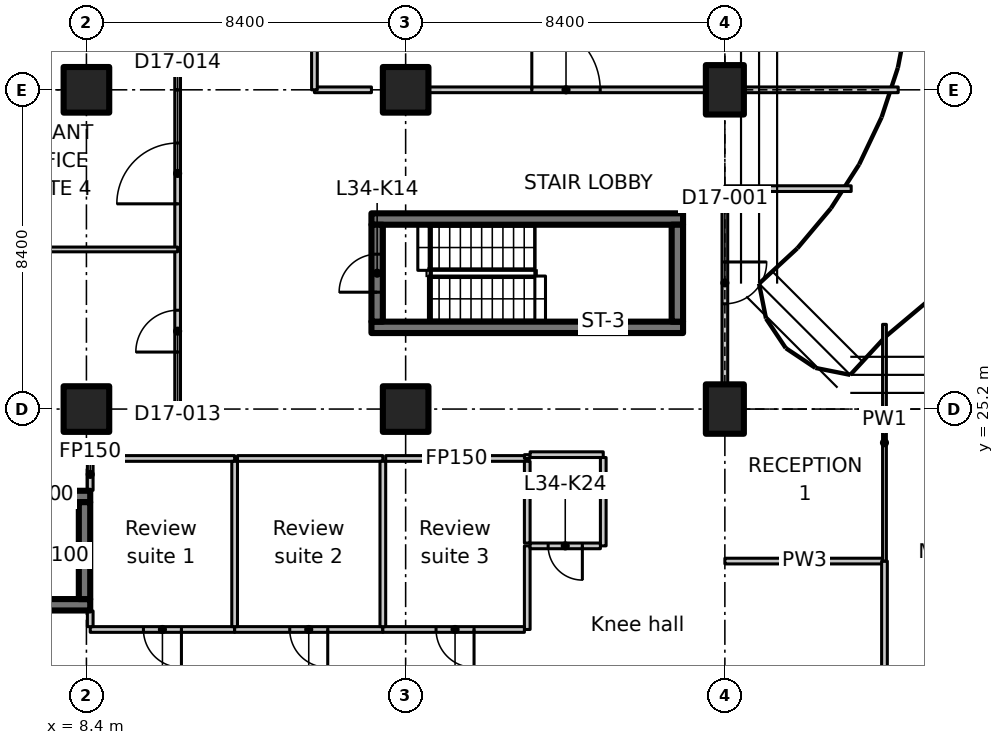
"""IFC4 building model, lengths in metres.
Left out: names, types, materials, properties, quantities, classifications, styles, units other than length and angle.
Written with IfcOpenShell. Run it as: python <this file> out.ifc"""

import sys

from ifc_helpers import new_model, si_unit, direction, frame, frame_2d, origin, origin_2d, place, context, subcontext, project, spatial, polyline, rectangle, outline, extrude, element, fill, save


model = new_model("IFC4")
c1 = context("Model", 3, precision=1e-05, world=origin(), true_north=direction((0.0, 1.0)))
c2 = subcontext(c1, "Body", "Model", "MODEL_VIEW")
j1 = project(units=[si_unit("LENGTHUNIT", "METRE"), si_unit("PLANEANGLEUNIT", "RADIAN")], contexts=[c1])
p1 = place(None, origin())
s1 = spatial("IfcSite", under=j1, at=p1, CompositionType="ELEMENT")
p2 = place(p1, origin())
s2 = spatial("IfcBuilding", under=s1, at=p2, CompositionType="ELEMENT")
p3 = place(p2, frame((0.0, 0.0, 138.5)))
s3 = spatial("IfcBuildingStorey", under=s2, at=p3, CompositionType="ELEMENT", Elevation=138.5)
for number, where, z_axis, x_axis in (
    (1, (8.4, 25.2, 0.0), (0.0, 0.0, 1.0), (1.0, 0.0, 0.0)),
    (2, (8.4, 33.6, 0.0), (0.0, 0.0, 1.0), (1.0, 0.0, 0.0)),
    (3, (16.8, 25.2, 0.0), (0.0, 0.0, 1.0), (1.0, 0.0, 0.0)),
    (4, (16.8, 33.6, 0.0), (0.0, 0.0, 1.0), (1.0, 0.0, 0.0)),
):
    element("IfcColumn", number, at=place(p3, frame(where, z_axis=z_axis, x_axis=x_axis)), inside=s3, PredefinedType="COLUMN", context=c2, shape_type="SweptSolid", body=[
        extrude(rectangle(XDim=1.2, YDim=1.2, at=origin_2d()), origin(), (0.0, 0.0, 1.0), 3.35),
    ])
for number, where, z_axis, x_axis in (
    (5, (25.2, 25.2, 0.0), (0.0, 0.0, 1.0), (1.0, 0.0, 0.0)),
    (6, (25.2, 33.6, 0.0), (0.0, 0.0, 1.0), (1.0, 0.0, 0.0)),
):
    element("IfcColumn", number, at=place(p3, frame(where, z_axis=z_axis, x_axis=x_axis)), inside=s3, PredefinedType="COLUMN", context=c2, shape_type="SweptSolid", body=[
        extrude(rectangle(XDim=1.0, YDim=1.3, at=origin_2d()), origin(), (0.0, 0.0, 1.0), 3.35),
    ])
p4 = place(p3, frame((8.5, 20.05, 0.0), z_axis=(0.0, 0.0, 1.0), x_axis=(-1.0, 0.0, 0.0)))
e7 = element("IfcWall", 7, at=p4, inside=s3, PredefinedType="SHEAR", context=c2, shape_type="SweptSolid", body=[
    extrude(rectangle(XDim=8.2, YDim=0.3, at=frame_2d((4.1, 0.0))), origin(), (0.0, 0.0, 1.0), 3.35),
])
p5 = place(p4, frame((6.8, 0.0, 0.0)))
e8 = element("IfcOpeningElement", 8, at=p5, cuts=e7, PredefinedType="OPENING", context=c2, shape_type="SweptSolid", body=[
    extrude(rectangle(XDim=1.0, YDim=2.1, at=frame_2d((0.5, 1.05))), frame((0.0, 0.16, 0.0), z_axis=(0.0, -1.0, 0.0), x_axis=(1.0, 0.0, 0.0)), (0.0, 0.0, 1.0), 0.32),
])
p6 = place(p3, frame((0.3, 22.9, 0.0), z_axis=(0.0, 0.0, 1.0), x_axis=(1.0, 0.0, 0.0)))
e9 = element("IfcWall", 9, at=p6, inside=s3, PredefinedType="SHEAR", context=c2, shape_type="SweptSolid", body=[
    extrude(rectangle(XDim=8.2, YDim=0.3, at=frame_2d((4.1, 0.0))), origin(), (0.0, 0.0, 1.0), 3.35),
])
p7 = place(p6, frame((0.4, 0.0, 0.0)))
e10 = element("IfcOpeningElement", 10, at=p7, cuts=e9, PredefinedType="OPENING", context=c2, shape_type="SweptSolid", body=[
    extrude(rectangle(XDim=1.0, YDim=2.1, at=frame_2d((0.5, 1.05))), frame((0.0, 0.16, 0.0), z_axis=(0.0, -1.0, 0.0), x_axis=(1.0, 0.0, 0.0)), (0.0, 0.0, 1.0), 0.32),
])
p8 = place(p3, frame((8.35, 20.2, 0.0), z_axis=(0.0, 0.0, 1.0), x_axis=(0.0, 1.0, 0.0)))
e11 = element("IfcWall", 11, at=p8, inside=s3, PredefinedType="SHEAR", context=c2, shape_type="SweptSolid", body=[
    extrude(rectangle(XDim=2.55, YDim=0.3, at=frame_2d((1.275, 0.0))), origin(), (0.0, 0.0, 1.0), 3.35),
])
for number, where, z_axis, x_axis in (
    (12, (15.9, 27.35, 0.0), (0.0, 0.0, 1.0), (1.0, 0.0, 0.0)),
    (13, (15.9, 30.2, 0.0), (0.0, 0.0, 1.0), (1.0, 0.0, 0.0)),
):
    element("IfcWall", number, at=place(p3, frame(where, z_axis=z_axis, x_axis=x_axis)), inside=s3, PredefinedType="SHEAR", context=c2, shape_type="SweptSolid", body=[
        extrude(rectangle(XDim=8.2, YDim=0.3, at=frame_2d((4.1, 0.0))), origin(), (0.0, 0.0, 1.0), 3.35),
    ])
p9 = place(p3, frame((16.05, 27.5, 0.0), z_axis=(0.0, 0.0, 1.0), x_axis=(0.0, 1.0, 0.0)))
e14 = element("IfcWall", 14, at=p9, inside=s3, PredefinedType="SHEAR", context=c2, shape_type="SweptSolid", body=[
    extrude(rectangle(XDim=2.55, YDim=0.3, at=frame_2d((1.275, 0.0))), origin(), (0.0, 0.0, 1.0), 3.35),
])
p10 = place(p9, frame((0.775, 0.0, 0.0)))
e15 = element("IfcOpeningElement", 15, at=p10, cuts=e14, PredefinedType="OPENING", context=c2, shape_type="SweptSolid", body=[
    extrude(rectangle(XDim=1.0, YDim=2.1, at=frame_2d((0.5, 1.05))), frame((0.0, 0.16, 0.0), z_axis=(0.0, -1.0, 0.0), x_axis=(1.0, 0.0, 0.0)), (0.0, 0.0, 1.0), 0.32),
])
p11 = place(p3, frame((23.95, 27.5, 0.0), z_axis=(0.0, 0.0, 1.0), x_axis=(0.0, 1.0, 0.0)))
e16 = element("IfcWall", 16, at=p11, inside=s3, PredefinedType="SHEAR", context=c2, shape_type="SweptSolid", body=[
    extrude(rectangle(XDim=2.55, YDim=0.3, at=frame_2d((1.275, 0.0))), origin(), (0.0, 0.0, 1.0), 3.35),
])
p12 = place(p3, frame((12.3, 19.4, 0.0), z_axis=(0.0, 0.0, 1.0), x_axis=(-1.0, 0.0, 0.0)))
e17 = element("IfcWall", 17, at=p12, inside=s3, PredefinedType="PARTITIONING", context=c2, shape_type="SweptSolid", body=[
    extrude(rectangle(XDim=3.8, YDim=0.15, at=frame_2d((1.9, 0.0))), origin(), (0.0, 0.0, 1.0), 3.35),
])
p13 = place(p12, frame((1.4, 0.0, 0.0)))
e18 = element("IfcOpeningElement", 18, at=p13, cuts=e17, PredefinedType="OPENING", context=c2, shape_type="SweptSolid", body=[
    extrude(rectangle(XDim=1.0, YDim=2.1, at=frame_2d((0.5, 1.05))), frame((0.0, 0.085, 0.0), z_axis=(0.0, -1.0, 0.0), x_axis=(1.0, 0.0, 0.0)), (0.0, 0.0, 1.0), 0.17),
])
p14 = place(p3, frame((8.5, 19.475, 0.0), z_axis=(0.0, 0.0, 1.0), x_axis=(0.0, 1.0, 0.0)))
e19 = element("IfcWall", 19, at=p14, inside=s3, PredefinedType="PARTITIONING", context=c2, shape_type="SweptSolid", body=[
    extrude(rectangle(XDim=0.413, YDim=0.15, at=frame_2d((0.207, 0.0))), origin(), (0.0, 0.0, 1.0), 3.35),
])
p15 = place(p3, frame((8.5, 23.062, 0.0), z_axis=(0.0, 0.0, 1.0), x_axis=(0.0, 1.0, 0.0)))
e20 = element("IfcWall", 20, at=p15, inside=s3, PredefinedType="PARTITIONING", context=c2, shape_type="SweptSolid", body=[
    extrude(rectangle(XDim=0.838, YDim=0.15, at=frame_2d((0.419, 0.0))), origin(), (0.0, 0.0, 1.0), 3.35),
])
p16 = place(p3, frame((8.575, 23.9, 0.0), z_axis=(0.0, 0.0, 1.0), x_axis=(1.0, 0.0, 0.0)))
e21 = element("IfcWall", 21, at=p16, inside=s3, PredefinedType="PARTITIONING", context=c2, shape_type="SweptSolid", body=[
    extrude(rectangle(XDim=3.725, YDim=0.15, at=frame_2d((1.863, 0.0))), origin(), (0.0, 0.0, 1.0), 3.35),
])
p17 = place(p3, frame((16.2, 19.4, 0.0), z_axis=(0.0, 0.0, 1.0), x_axis=(-1.0, 0.0, 0.0)))
e22 = element("IfcWall", 22, at=p17, inside=s3, PredefinedType="PARTITIONING", context=c2, shape_type="SweptSolid", body=[
    extrude(rectangle(XDim=3.9, YDim=0.15, at=frame_2d((1.95, 0.0))), origin(), (0.0, 0.0, 1.0), 3.35),
])
p18 = place(p17, frame((1.45, 0.0, 0.0)))
e23 = element("IfcOpeningElement", 23, at=p18, cuts=e22, PredefinedType="OPENING", context=c2, shape_type="SweptSolid", body=[
    extrude(rectangle(XDim=1.0, YDim=2.1, at=frame_2d((0.5, 1.05))), frame((0.0, 0.085, 0.0), z_axis=(0.0, -1.0, 0.0), x_axis=(1.0, 0.0, 0.0)), (0.0, 0.0, 1.0), 0.17),
])
p19 = place(p3, frame((12.3, 23.825, 0.0), z_axis=(0.0, 0.0, 1.0), x_axis=(0.0, -1.0, 0.0)))
e24 = element("IfcWall", 24, at=p19, inside=s3, PredefinedType="PARTITIONING", context=c2, shape_type="SweptSolid", body=[
    extrude(rectangle(XDim=4.35, YDim=0.15, at=frame_2d((2.175, 0.0))), origin(), (0.0, 0.0, 1.0), 3.35),
])
p20 = place(p3, frame((12.375, 23.9, 0.0), z_axis=(0.0, 0.0, 1.0), x_axis=(1.0, 0.0, 0.0)))
e25 = element("IfcWall", 25, at=p20, inside=s3, PredefinedType="PARTITIONING", context=c2, shape_type="SweptSolid", body=[
    extrude(rectangle(XDim=3.825, YDim=0.15, at=frame_2d((1.913, 0.0))), origin(), (0.0, 0.0, 1.0), 3.35),
])
p21 = place(p3, frame((20.0, 21.6, 0.0), z_axis=(0.0, 0.0, 1.0), x_axis=(0.0, -1.0, 0.0)))
e26 = element("IfcWall", 26, at=p21, inside=s3, PredefinedType="PARTITIONING", context=c2, shape_type="SweptSolid", body=[
    extrude(rectangle(XDim=2.2, YDim=0.15, at=frame_2d((1.1, 0.0))), origin(), (0.0, 0.0, 1.0), 3.35),
])
p22 = place(p3, frame((19.925, 19.4, 0.0), z_axis=(0.0, 0.0, 1.0), x_axis=(-1.0, 0.0, 0.0)))
e27 = element("IfcWall", 27, at=p22, inside=s3, PredefinedType="PARTITIONING", context=c2, shape_type="SweptSolid", body=[
    extrude(rectangle(XDim=3.725, YDim=0.15, at=frame_2d((1.863, 0.0))), origin(), (0.0, 0.0, 1.0), 3.35),
])
p23 = place(p22, frame((1.325, 0.0, 0.0)))
e28 = element("IfcOpeningElement", 28, at=p23, cuts=e27, PredefinedType="OPENING", context=c2, shape_type="SweptSolid", body=[
    extrude(rectangle(XDim=1.0, YDim=2.1, at=frame_2d((0.5, 1.05))), frame((0.0, 0.085, 0.0), z_axis=(0.0, -1.0, 0.0), x_axis=(1.0, 0.0, 0.0)), (0.0, 0.0, 1.0), 0.17),
])
p24 = place(p3, frame((16.2, 23.825, 0.0), z_axis=(0.0, 0.0, 1.0), x_axis=(0.0, -1.0, 0.0)))
e29 = element("IfcWall", 29, at=p24, inside=s3, PredefinedType="PARTITIONING", context=c2, shape_type="SweptSolid", body=[
    extrude(rectangle(XDim=4.35, YDim=0.15, at=frame_2d((2.175, 0.0))), origin(), (0.0, 0.0, 1.0), 3.35),
])
p25 = place(p3, frame((16.275, 23.9, 0.0), z_axis=(0.0, 0.0, 1.0), x_axis=(1.0, 0.0, 0.0)))
e30 = element("IfcWall", 30, at=p25, inside=s3, PredefinedType="PARTITIONING", context=c2, shape_type="SweptSolid", body=[
    extrude(rectangle(XDim=3.725, YDim=0.15, at=frame_2d((1.863, 0.0))), origin(), (0.0, 0.0, 1.0), 3.35),
])
p26 = place(p3, frame((20.0, 23.9, 0.0), z_axis=(0.0, 0.0, 1.0), x_axis=(0.0, 1.0, 0.0)))
e31 = element("IfcWall", 31, at=p26, inside=s3, PredefinedType="PARTITIONING", context=c2, shape_type="SweptSolid", body=[
    extrude(rectangle(XDim=0.1, YDim=0.15, at=frame_2d((0.05, 0.0))), origin(), (0.0, 0.0, 1.0), 3.35),
])
p27 = place(p3, frame((20.075, 24.0, 0.0), z_axis=(0.0, 0.0, 1.0), x_axis=(1.0, 0.0, 0.0)))
e32 = element("IfcWall", 32, at=p27, inside=s3, PredefinedType="PARTITIONING", context=c2, shape_type="SweptSolid", body=[
    extrude(rectangle(XDim=1.925, YDim=0.15, at=frame_2d((0.962, 0.0))), origin(), (0.0, 0.0, 1.0), 3.35),
])
p28 = place(p3, frame((22.0, 23.925, 0.0), z_axis=(0.0, 0.0, 1.0), x_axis=(0.0, -1.0, 0.0)))
e33 = element("IfcWall", 33, at=p28, inside=s3, PredefinedType="PARTITIONING", context=c2, shape_type="SweptSolid", body=[
    extrude(rectangle(XDim=2.325, YDim=0.15, at=frame_2d((1.163, 0.0))), origin(), (0.0, 0.0, 1.0), 3.35),
])
p29 = place(p3, frame((21.925, 21.6, 0.0), z_axis=(0.0, 0.0, 1.0), x_axis=(-1.0, 0.0, 0.0)))
e34 = element("IfcWall", 34, at=p29, inside=s3, PredefinedType="PARTITIONING", context=c2, shape_type="SweptSolid", body=[
    extrude(rectangle(XDim=1.85, YDim=0.15, at=frame_2d((0.925, 0.0))), origin(), (0.0, 0.0, 1.0), 3.35),
])
p30 = place(p29, frame((0.475, 0.0, 0.0)))
e35 = element("IfcOpeningElement", 35, at=p30, cuts=e34, PredefinedType="OPENING", context=c2, shape_type="SweptSolid", body=[
    extrude(rectangle(XDim=0.9, YDim=2.1, at=frame_2d((0.45, 1.05))), frame((0.0, 0.085, 0.0), z_axis=(0.0, -1.0, 0.0), x_axis=(1.0, 0.0, 0.0)), (0.0, 0.0, 1.0), 0.17),
])
p31 = place(p3, frame((20.0, 21.675, 0.0), z_axis=(0.0, 0.0, 1.0), x_axis=(0.0, 1.0, 0.0)))
e36 = element("IfcWall", 36, at=p31, inside=s3, PredefinedType="PARTITIONING", context=c2, shape_type="SweptSolid", body=[
    extrude(rectangle(XDim=2.15, YDim=0.15, at=frame_2d((1.075, 0.0))), origin(), (0.0, 0.0, 1.0), 3.35),
])
p32 = place(p3, frame((25.2, 21.2, 0.0), z_axis=(0.0, 0.0, 1.0), x_axis=(1.0, 0.0, 0.0)))
e37 = element("IfcWall", 37, at=p32, inside=s3, PredefinedType="PARTITIONING", context=c2, shape_type="SweptSolid", body=[
    extrude(rectangle(XDim=4.2, YDim=0.15, at=frame_2d((2.1, 0.0))), origin(), (0.0, 0.0, 1.0), 3.33),
])
p33 = place(p3, frame((29.4, 21.2, 0.0), z_axis=(0.0, 0.0, 1.0), x_axis=(0.0, -1.0, 0.0)))
e38 = element("IfcWall", 38, at=p33, inside=s3, PredefinedType="PARTITIONING", context=c2, shape_type="SweptSolid", body=[
    extrude(rectangle(XDim=8.2, YDim=0.15, at=frame_2d((4.1, 0.0))), origin(), (0.0, 0.0, 1.0), 3.33),
])
p34 = place(p33, frame((3.3, 0.0, 0.0)))
e39 = element("IfcOpeningElement", 39, at=p34, cuts=e38, PredefinedType="OPENING", context=c2, shape_type="SweptSolid", body=[
    extrude(rectangle(XDim=1.6, YDim=2.1, at=frame_2d((0.8, 1.05))), frame((0.0, 0.085, 0.0), z_axis=(0.0, -1.0, 0.0), x_axis=(1.0, 0.0, 0.0)), (0.0, 0.0, 1.0), 0.17),
])
p35 = place(p3, frame((29.4, 27.429, 0.0), z_axis=(0.0, 0.0, 1.0), x_axis=(0.0, -1.0, 0.0)))
e40 = element("IfcWall", 40, at=p35, inside=s3, PredefinedType="PARTITIONING", context=c2, shape_type="SweptSolid", body=[
    extrude(outline(polyline([(0.0, 0.0), (6.229, 0.0), (6.229, 3.33), (2.679, 3.33), (2.677, 2.98), (1.781, 2.98), (1.779, 3.33), (0.154, 3.33), (0.0, 3.33), (0.0, 0.0)])), frame((0.0, 0.05, 0.0), z_axis=(0.0, -1.0, 0.0), x_axis=(1.0, 0.0, 0.0)), (0.0, 0.0, 1.0), 0.1),
])
p36 = place(p3, frame((25.2, 31.0, 0.0), z_axis=(0.0, 0.0, 1.0), x_axis=(0.0, -1.0, 0.0)))
e41 = element("IfcWall", 41, at=p36, inside=s3, PredefinedType="PARTITIONING", context=c2, shape_type="SweptSolid", body=[
    extrude(outline(polyline([(0.0, 0.0), (5.13, 0.0), (5.13, 2.98), (0.0, 2.98), (0.0, 0.0)])), frame((0.0, 0.075, 0.0), z_axis=(0.0, -1.0, 0.0), x_axis=(1.0, 0.0, 0.0)), (0.0, 0.0, 1.0), 0.15),
])
p37 = place(p36, frame((1.93, 0.0, 0.0)))
e42 = element("IfcOpeningElement", 42, at=p37, cuts=e41, PredefinedType="OPENING", context=c2, shape_type="SweptSolid", body=[
    extrude(rectangle(XDim=1.1, YDim=2.1, at=frame_2d((0.55, 1.05))), frame((0.0, 0.085, 0.0), z_axis=(0.0, -1.0, 0.0), x_axis=(1.0, 0.0, 0.0)), (0.0, 0.0, 1.0), 0.17),
])
p38 = place(p3, frame((25.2, 31.0, 0.0), z_axis=(0.0, 0.0, 1.0), x_axis=(1.0, 0.0, 0.0)))
e43 = element("IfcWall", 43, at=p38, inside=s3, PredefinedType="PARTITIONING", context=c2, shape_type="SweptSolid", body=[
    extrude(rectangle(XDim=3.324, YDim=0.15, at=frame_2d((1.662, 0.0))), origin(), (0.0, 0.0, 1.0), 2.98),
])
p39 = place(p3, frame((10.8, 25.2, 0.0), z_axis=(0.0, 0.0, 1.0), x_axis=(0.0, 1.0, 0.0)))
e44 = element("IfcWall", 44, at=p39, inside=s3, PredefinedType="PARTITIONING", context=c2, shape_type="SweptSolid", body=[
    extrude(rectangle(XDim=4.2, YDim=0.15, at=frame_2d((2.1, 0.0))), origin(), (0.0, 0.0, 1.0), 3.33),
])
p40 = place(p39, frame((1.5, 0.0, 0.0)))
e45 = element("IfcOpeningElement", 45, at=p40, cuts=e44, PredefinedType="OPENING", context=c2, shape_type="SweptSolid", body=[
    extrude(rectangle(XDim=1.1, YDim=2.1, at=frame_2d((0.55, 1.05))), frame((0.0, 0.085, 0.0), z_axis=(0.0, -1.0, 0.0), x_axis=(1.0, 0.0, 0.0)), (0.0, 0.0, 1.0), 0.17),
])
p41 = place(p3, frame((10.8, 29.4, 0.0), z_axis=(0.0, 0.0, 1.0), x_axis=(0.0, 1.0, 0.0)))
e46 = element("IfcWall", 46, at=p41, inside=s3, PredefinedType="PARTITIONING", context=c2, shape_type="SweptSolid", body=[
    extrude(rectangle(XDim=4.2, YDim=0.15, at=frame_2d((2.1, 0.0))), origin(), (0.0, 0.0, 1.0), 3.33),
])
p42 = place(p41, frame((1.2, 0.0, 0.0)))
e47 = element("IfcOpeningElement", 47, at=p42, cuts=e46, PredefinedType="OPENING", context=c2, shape_type="SweptSolid", body=[
    extrude(rectangle(XDim=1.6, YDim=2.1, at=frame_2d((0.8, 1.05))), frame((0.0, 0.085, 0.0), z_axis=(0.0, -1.0, 0.0), x_axis=(1.0, 0.0, 0.0)), (0.0, 0.0, 1.0), 0.17),
])
p43 = place(p3, frame((14.4, 33.6, 0.0), z_axis=(0.0, 0.0, 1.0), x_axis=(1.0, 0.0, 0.0)))
e48 = element("IfcWall", 48, at=p43, inside=s3, PredefinedType="PARTITIONING", context=c2, shape_type="SweptSolid", body=[
    extrude(rectangle(XDim=1.5, YDim=0.15, at=frame_2d((0.75, 0.0))), origin(), (0.0, 0.0, 1.0), 3.33),
])
p44 = place(p3, frame((17.42, 33.6, 0.0), z_axis=(0.0, 0.0, 1.0), x_axis=(1.0, 0.0, 0.0)))
e49 = element("IfcWall", 49, at=p44, inside=s3, PredefinedType="PARTITIONING", context=c2, shape_type="SweptSolid", body=[
    extrude(rectangle(XDim=7.26, YDim=0.15, at=frame_2d((3.63, 0.0))), origin(), (0.0, 0.0, 1.0), 3.33),
])
p45 = place(p44, frame((2.7, 0.0, 0.0)))
e50 = element("IfcOpeningElement", 50, at=p45, cuts=e49, PredefinedType="OPENING", context=c2, shape_type="SweptSolid", body=[
    extrude(rectangle(XDim=1.8, YDim=2.1, at=frame_2d((0.9, 1.05))), frame((0.0, 0.085, 0.0), z_axis=(0.0, -1.0, 0.0), x_axis=(1.0, 0.0, 0.0)), (0.0, 0.0, 1.0), 0.17),
])
p46 = place(p3, frame((25.72, 33.6, 0.0), z_axis=(0.0, 0.0, 1.0), x_axis=(1.0, 0.0, 0.0)))
e51 = element("IfcWall", 51, at=p46, inside=s3, PredefinedType="PARTITIONING", context=c2, shape_type="SweptSolid", body=[
    extrude(rectangle(XDim=4.042, YDim=0.15, at=frame_2d((2.021, 0.0))), origin(), (0.0, 0.0, 1.0), 2.98),
])
p47 = place(p3, frame((10.8, 33.6, 0.0), z_axis=(0.0, 0.0, 1.0), x_axis=(0.0, 1.0, 0.0)))
e52 = element("IfcWall", 52, at=p47, inside=s3, PredefinedType="PARTITIONING", context=c2, shape_type="SweptSolid", body=[
    extrude(rectangle(XDim=4.2, YDim=0.15, at=frame_2d((2.1, 0.0))), origin(), (0.0, 0.0, 1.0), 3.33),
])
p48 = place(p3, frame((14.4, 42.0, 0.0), z_axis=(0.0, 0.0, 1.0), x_axis=(0.0, -1.0, 0.0)))
e53 = element("IfcWall", 53, at=p48, inside=s3, PredefinedType="PARTITIONING", context=c2, shape_type="SweptSolid", body=[
    extrude(rectangle(XDim=8.4, YDim=0.15, at=frame_2d((4.2, 0.0))), origin(), (0.0, 0.0, 1.0), 3.33),
])
p49 = place(p3, frame((-1.609, 29.4, 0.0), z_axis=(0.0, 0.0, 1.0), x_axis=(1.0, 0.0, 0.0)))
e54 = element("IfcWall", 54, at=p49, inside=s3, PredefinedType="PARTITIONING", context=c2, shape_type="SweptSolid", body=[
    extrude(outline(polyline([(0.0, 0.0), (12.409, 0.0), (12.409, 3.33), (2.059, 3.33), (2.057, 2.98), (1.161, 2.98), (1.159, 3.33), (0.509, 3.33), (0.0, 3.33), (0.0, 0.0)])), frame((0.0, 0.062, 0.0), z_axis=(0.0, -1.0, 0.0), x_axis=(1.0, 0.0, 0.0)), (0.0, 0.0, 1.0), 0.125),
])
p50 = place(p10, origin())
e55 = element("IfcDoor", 55, at=p50, inside=s3, OperationType="SINGLE_SWING_RIGHT", PredefinedType="DOOR", context=c2, shape_type="SweptSolid", body=[
    extrude(rectangle(XDim=1.0, YDim=2.1, at=frame_2d((0.5, 1.05))), frame((0.0, 0.025, 0.0), z_axis=(0.0, -1.0, 0.0), x_axis=(1.0, 0.0, 0.0)), (0.0, 0.0, 1.0), 0.05),
])
fill(e15, e55)
p51 = place(p30, origin())
e56 = element("IfcDoor", 56, at=p51, inside=s3, OperationType="SINGLE_SWING_RIGHT", PredefinedType="DOOR", context=c2, shape_type="SweptSolid", body=[
    extrude(rectangle(XDim=0.9, YDim=2.1, at=frame_2d((0.45, 1.05))), frame((0.0, 0.025, 0.0), z_axis=(0.0, -1.0, 0.0), x_axis=(1.0, 0.0, 0.0)), (0.0, 0.0, 1.0), 0.05),
])
fill(e35, e56)
p52 = place(p13, origin())
e57 = element("IfcDoor", 57, at=p52, inside=s3, OperationType="SINGLE_SWING_LEFT", PredefinedType="DOOR", context=c2, shape_type="SweptSolid", body=[
    extrude(rectangle(XDim=1.0, YDim=2.1, at=frame_2d((0.5, 1.05))), frame((0.0, 0.025, 0.0), z_axis=(0.0, -1.0, 0.0), x_axis=(1.0, 0.0, 0.0)), (0.0, 0.0, 1.0), 0.05),
])
fill(e18, e57)
p53 = place(p18, origin())
e58 = element("IfcDoor", 58, at=p53, inside=s3, OperationType="SINGLE_SWING_RIGHT", PredefinedType="DOOR", context=c2, shape_type="SweptSolid", body=[
    extrude(rectangle(XDim=1.0, YDim=2.1, at=frame_2d((0.5, 1.05))), frame((0.0, 0.025, 0.0), z_axis=(0.0, -1.0, 0.0), x_axis=(1.0, 0.0, 0.0)), (0.0, 0.0, 1.0), 0.05),
])
fill(e23, e58)
p54 = place(p23, origin())
e59 = element("IfcDoor", 59, at=p54, inside=s3, OperationType="SINGLE_SWING_LEFT", PredefinedType="DOOR", context=c2, shape_type="SweptSolid", body=[
    extrude(rectangle(XDim=1.0, YDim=2.1, at=frame_2d((0.5, 1.05))), frame((0.0, 0.025, 0.0), z_axis=(0.0, -1.0, 0.0), x_axis=(1.0, 0.0, 0.0)), (0.0, 0.0, 1.0), 0.05),
])
fill(e28, e59)
p55 = place(p37, origin())
e60 = element("IfcDoor", 60, at=p55, inside=s3, OperationType="SINGLE_SWING_RIGHT", PredefinedType="DOOR", context=c2, shape_type="SweptSolid", body=[
    extrude(rectangle(XDim=1.1, YDim=2.1, at=frame_2d((0.55, 1.05))), frame((0.0, 0.025, 0.0), z_axis=(0.0, -1.0, 0.0), x_axis=(1.0, 0.0, 0.0)), (0.0, 0.0, 1.0), 0.05),
])
fill(e42, e60)
p56 = place(p40, origin())
e61 = element("IfcDoor", 61, at=p56, inside=s3, OperationType="SINGLE_SWING_LEFT", PredefinedType="DOOR", context=c2, shape_type="SweptSolid", body=[
    extrude(rectangle(XDim=1.1, YDim=2.1, at=frame_2d((0.55, 1.05))), frame((0.0, 0.025, 0.0), z_axis=(0.0, -1.0, 0.0), x_axis=(1.0, 0.0, 0.0)), (0.0, 0.0, 1.0), 0.05),
])
fill(e45, e61)
p57 = place(p42, origin())
e62 = element("IfcDoor", 62, at=p57, inside=s3, OperationType="DOUBLE_DOOR_SINGLE_SWING", PredefinedType="DOOR", context=c2, shape_type="SweptSolid", body=[
    extrude(rectangle(XDim=1.6, YDim=2.1, at=frame_2d((0.8, 1.05))), frame((0.0, 0.025, 0.0), z_axis=(0.0, -1.0, 0.0), x_axis=(1.0, 0.0, 0.0)), (0.0, 0.0, 1.0), 0.05),
])
fill(e47, e62)
p58 = place(p45, origin())
e63 = element("IfcDoor", 63, at=p58, inside=s3, OperationType="DOUBLE_DOOR_SINGLE_SWING", PredefinedType="DOOR", context=c2, shape_type="SweptSolid", body=[
    extrude(rectangle(XDim=1.8, YDim=2.1, at=frame_2d((0.9, 1.05))), frame((0.0, 0.025, 0.0), z_axis=(0.0, -1.0, 0.0), x_axis=(1.0, 0.0, 0.0)), (0.0, 0.0, 1.0), 0.05),
])
fill(e50, e63)
save(model, sys.argv[1])
